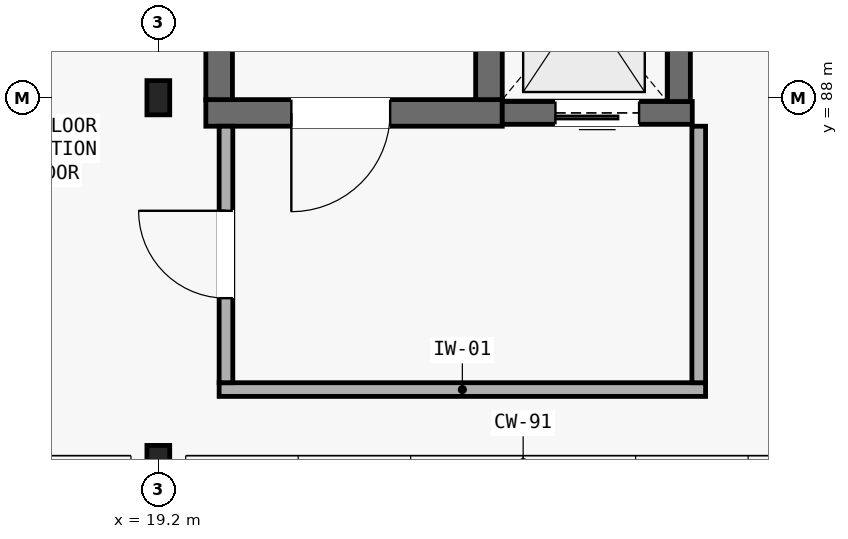
"""IFC4 building model, lengths in metres.
Left out: names, types, materials, properties, quantities, classifications, styles, units other than length and angle.
Written with IfcOpenShell. Run it as: python <this file> out.ifc"""

import sys

from ifc_helpers import new_model, si_unit, direction, frame, frame_2d, origin, origin_2d, place, context, subcontext, project, spatial, rectangle, i_section, extrude, element, fill, save


model = new_model("IFC4")
c1 = context("Model", 3, precision=1e-05, world=origin(), true_north=direction((0.0, 1.0)))
c2 = subcontext(c1, "Body", "Model", "MODEL_VIEW")
j1 = project(units=[si_unit("LENGTHUNIT", "METRE"), si_unit("PLANEANGLEUNIT", "RADIAN")], contexts=[c1])
p1 = place(None, origin())
s1 = spatial("IfcSite", under=j1, at=p1, CompositionType="ELEMENT")
p2 = place(p1, origin())
s2 = spatial("IfcBuilding", under=s1, at=p2, CompositionType="ELEMENT")
p3 = place(p2, frame((0.0, 0.0, 22.05)))
s3 = spatial("IfcBuildingStorey", under=s2, at=p3, CompositionType="ELEMENT", Elevation=22.05)
for number, where, z_axis, x_axis in (
    (1, (19.2, 83.2, 0.0), (0.0, 0.0, 1.0), (1.0, 0.0, 0.0)),
    (2, (19.2, 88.0, 0.0), (0.0, 0.0, 1.0), (1.0, 0.0, 0.0)),
):
    element("IfcColumn", number, at=place(p3, frame(where, z_axis=z_axis, x_axis=x_axis)), inside=s3, PredefinedType="COLUMN", context=c2, shape_type="SweptSolid", body=[
        extrude(i_section(OverallWidth=0.3, OverallDepth=0.45, WebThickness=0.014, FlangeThickness=0.026, FilletRadius=0.027, at=origin_2d()), origin(), (0.0, 0.0, 1.0), 4.2),
    ])
p4 = place(p3, frame((19.825, 87.8, 0.0), z_axis=(0.0, 0.0, 1.0), x_axis=(1.0, 0.0, 0.0)))
e3 = element("IfcWall", 3, at=p4, inside=s3, PredefinedType="SHEAR", context=c2, shape_type="SweptSolid", body=[
    extrude(rectangle(XDim=3.9, YDim=0.35, at=frame_2d((1.95, 0.0))), origin(), (0.0, 0.0, 1.0), 4.0),
])
p5 = place(p4, frame((1.125, 0.0, 0.0)))
e4 = element("IfcOpeningElement", 4, at=p5, cuts=e3, PredefinedType="OPENING", context=c2, shape_type="SweptSolid", body=[
    extrude(rectangle(XDim=1.3, YDim=2.15, at=frame_2d((0.65, 1.075))), frame((0.0, 0.185, 0.0), z_axis=(0.0, -1.0, 0.0), x_axis=(1.0, 0.0, 0.0)), (0.0, 0.0, 1.0), 0.37),
])
for number, where, z_axis, x_axis in (
    (5, (20.0, 87.975, 0.0), (0.0, 0.0, 1.0), (0.0, 1.0, 0.0)),
    (6, (23.55, 87.975, 0.0), (0.0, 0.0, 1.0), (0.0, 1.0, 0.0)),
):
    element("IfcWall", number, at=place(p3, frame(where, z_axis=z_axis, x_axis=x_axis)), inside=s3, PredefinedType="SHEAR", context=c2, shape_type="SweptSolid", body=[
        extrude(rectangle(XDim=7.6, YDim=0.35, at=frame_2d((3.8, 0.0))), origin(), (0.0, 0.0, 1.0), 4.0),
    ])
p6 = place(p3, frame((23.725, 87.8, 0.0), z_axis=(0.0, 0.0, 1.0), x_axis=(1.0, 0.0, 0.0)))
e7 = element("IfcWall", 7, at=p6, inside=s3, PredefinedType="SHEAR", context=c2, shape_type="SweptSolid", body=[
    extrude(rectangle(XDim=2.5, YDim=0.3, at=frame_2d((1.25, 0.0))), origin(), (0.0, 0.0, 1.0), 4.0),
])
p7 = place(p6, frame((0.7, 0.0, 0.0)))
e8 = element("IfcOpeningElement", 8, at=p7, cuts=e7, PredefinedType="OPENING", context=c2, shape_type="SweptSolid", body=[
    extrude(rectangle(XDim=1.1, YDim=2.1, at=frame_2d((0.55, 1.05))), frame((0.0, 0.16, 0.0), z_axis=(0.0, -1.0, 0.0), x_axis=(1.0, 0.0, 0.0)), (0.0, 0.0, 1.0), 0.32),
])
p8 = place(p3, frame((26.05, 87.95, 0.0), z_axis=(0.0, 0.0, 1.0), x_axis=(0.0, 1.0, 0.0)))
e9 = element("IfcWall", 9, at=p8, inside=s3, PredefinedType="SHEAR", context=c2, shape_type="SweptSolid", body=[
    extrude(rectangle(XDim=2.65, YDim=0.3, at=frame_2d((1.325, 0.0))), origin(), (0.0, 0.0, 1.0), 4.0),
])
p9 = place(p3, frame((20.0, 84.16, 0.0), z_axis=(0.0, 0.0, 1.0), x_axis=(1.0, 0.0, 0.0)))
e10 = element("IfcWall", 10, at=p9, inside=s3, PredefinedType="PARTITIONING", context=c2, shape_type="SweptSolid", body=[
    extrude(rectangle(XDim=6.4, YDim=0.18, at=frame_2d((3.2, 0.0))), origin(), (0.0, 0.0, 1.0), 4.0),
])
p10 = place(p3, frame((20.09, 84.25, 0.0), z_axis=(0.0, 0.0, 1.0), x_axis=(0.0, 1.0, 0.0)))
e11 = element("IfcWall", 11, at=p10, inside=s3, PredefinedType="PARTITIONING", context=c2, shape_type="SweptSolid", body=[
    extrude(rectangle(XDim=3.375, YDim=0.18, at=frame_2d((1.688, 0.0))), origin(), (0.0, 0.0, 1.0), 4.0),
])
p11 = place(p10, frame((1.113, 0.0, 0.0)))
e12 = element("IfcOpeningElement", 12, at=p11, cuts=e11, PredefinedType="OPENING", context=c2, shape_type="SweptSolid", body=[
    extrude(rectangle(XDim=1.15, YDim=2.15, at=frame_2d((0.575, 1.075))), frame((0.0, 0.1, 0.0), z_axis=(0.0, -1.0, 0.0), x_axis=(1.0, 0.0, 0.0)), (0.0, 0.0, 1.0), 0.2),
])
p12 = place(p3, frame((26.31, 84.25, 0.0), z_axis=(0.0, 0.0, 1.0), x_axis=(0.0, 1.0, 0.0)))
e13 = element("IfcWall", 13, at=p12, inside=s3, PredefinedType="PARTITIONING", context=c2, shape_type="SweptSolid", body=[
    extrude(rectangle(XDim=3.375, YDim=0.18, at=frame_2d((1.688, 0.0))), origin(), (0.0, 0.0, 1.0), 4.0),
])
p13 = place(p5, frame((1.3, 0.0, 0.0), z_axis=(0.0, 0.0, 1.0), x_axis=(-1.0, 0.0, 0.0)))
e14 = element("IfcDoor", 14, at=p13, inside=s3, OperationType="SINGLE_SWING_LEFT", PredefinedType="DOOR", context=c2, shape_type="SweptSolid", body=[
    extrude(rectangle(XDim=1.3, YDim=2.15, at=frame_2d((0.65, 1.075))), frame((0.0, 0.025, 0.0), z_axis=(0.0, -1.0, 0.0), x_axis=(1.0, 0.0, 0.0)), (0.0, 0.0, 1.0), 0.05),
])
fill(e4, e14)
p14 = place(p7, frame((1.1, 0.0, 0.0), z_axis=(0.0, 0.0, 1.0), x_axis=(-1.0, 0.0, 0.0)))
e15 = element("IfcDoor", 15, at=p14, inside=s3, OperationType="SLIDING_TO_LEFT", PredefinedType="DOOR", context=c2, shape_type="SweptSolid", body=[
    extrude(rectangle(XDim=1.1, YDim=2.1, at=frame_2d((0.55, 1.05))), frame((0.0, 0.025, 0.0), z_axis=(0.0, -1.0, 0.0), x_axis=(1.0, 0.0, 0.0)), (0.0, 0.0, 1.0), 0.05),
])
fill(e8, e15)
p15 = place(p11, origin())
e16 = element("IfcDoor", 16, at=p15, inside=s3, OperationType="SINGLE_SWING_RIGHT", PredefinedType="DOOR", context=c2, shape_type="SweptSolid", body=[
    extrude(rectangle(XDim=1.15, YDim=2.15, at=frame_2d((0.575, 1.075))), frame((0.0, 0.025, 0.0), z_axis=(0.0, -1.0, 0.0), x_axis=(1.0, 0.0, 0.0)), (0.0, 0.0, 1.0), 0.05),
])
fill(e12, e16)
save(model, sys.argv[1])
